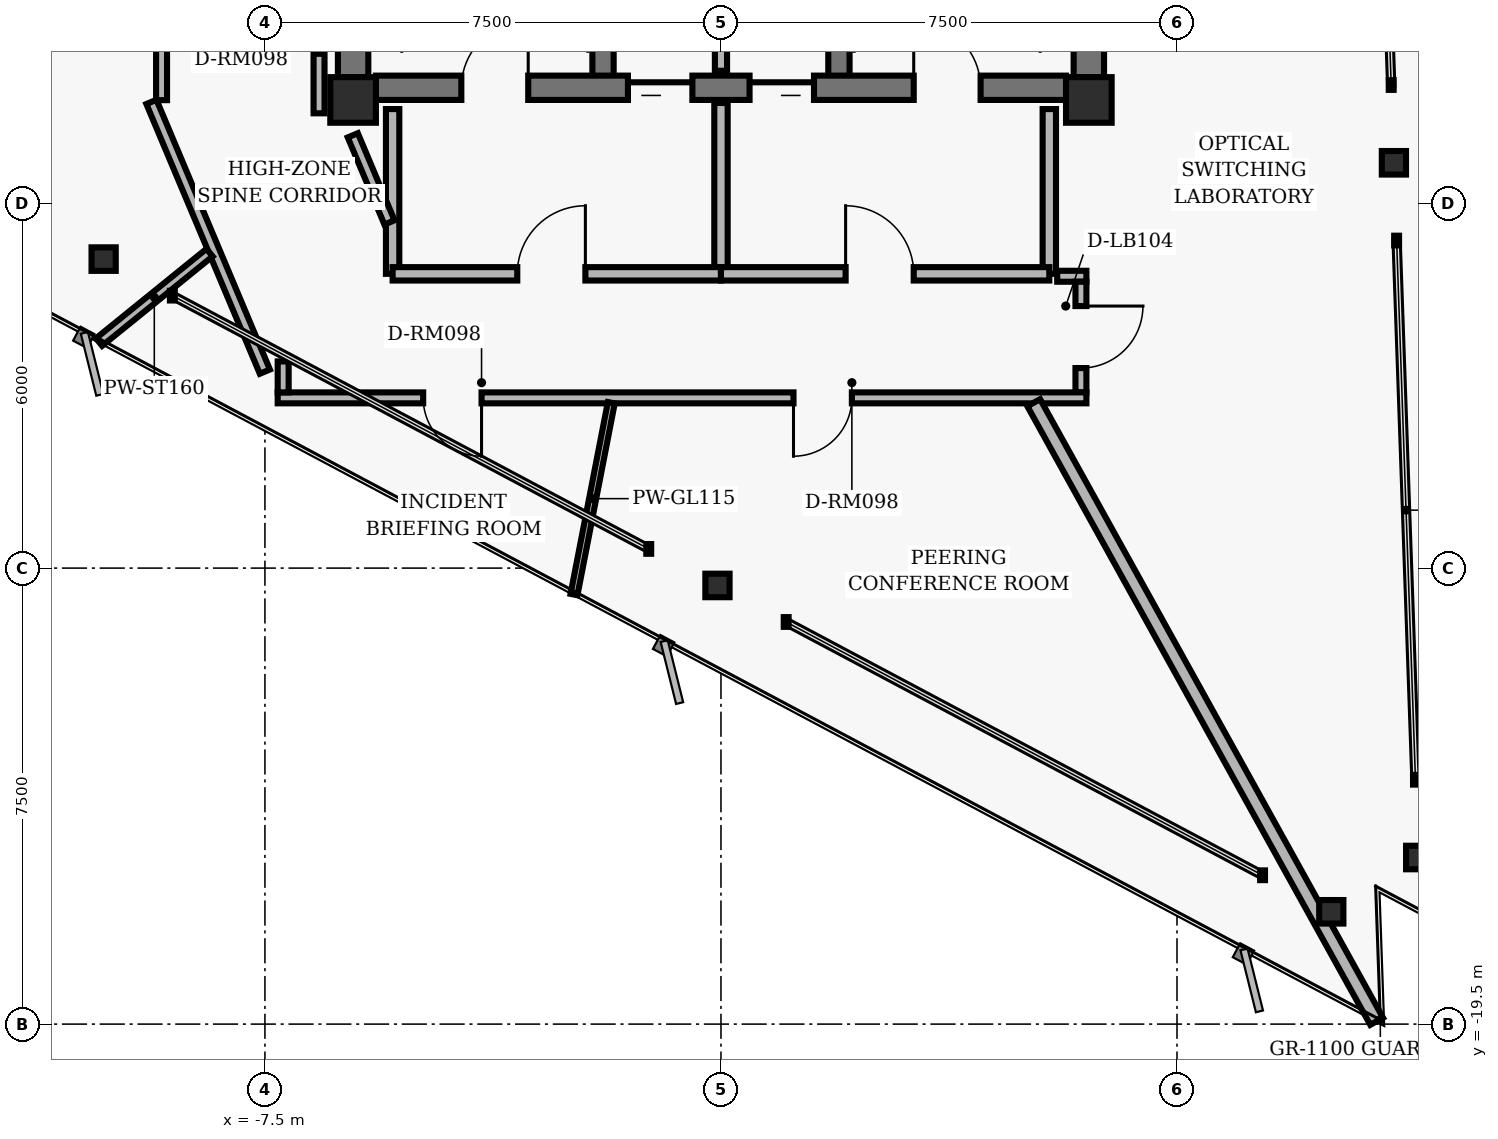
"""IFC4 building model, lengths in metres.
Left out: names, types, materials, properties, quantities, classifications, styles, units other than length and angle.
Written with IfcOpenShell. Run it as: python <this file> out.ifc"""

import sys

from ifc_helpers import new_model, si_unit, direction, frame, frame_2d, origin, origin_2d, place, context, subcontext, project, spatial, rectangle, hollow_rectangle, i_section, extrude, element, fill, save


model = new_model("IFC4")
c1 = context("Model", 3, precision=1e-05, world=origin(), true_north=direction((0.0, 1.0)))
c2 = subcontext(c1, "Body", "Model", "MODEL_VIEW")
j1 = project(units=[si_unit("LENGTHUNIT", "METRE"), si_unit("PLANEANGLEUNIT", "RADIAN")], contexts=[c1])
p1 = place(None, origin())
s1 = spatial("IfcSite", under=j1, at=p1, CompositionType="ELEMENT")
p2 = place(p1, origin())
s2 = spatial("IfcBuilding", under=s1, at=p2, CompositionType="ELEMENT")
p3 = place(p2, frame((0.0, 0.0, 193.6)))
s3 = spatial("IfcBuildingStorey", under=s2, at=p3, CompositionType="ELEMENT", Elevation=193.6)
for number, where, z_axis, x_axis in (
    (1, (-6.05, -4.3, 0.0), (0.0, 0.0, 1.0), (1.0, 0.0, 0.0)),
    (2, (6.05, -4.3, 0.0), (0.0, 0.0, 1.0), (1.0, 0.0, 0.0)),
):
    element("IfcColumn", number, at=place(p3, frame(where, z_axis=z_axis, x_axis=x_axis)), inside=s3, PredefinedType="COLUMN", context=c2, shape_type="SweptSolid", body=[
        extrude(hollow_rectangle(XDim=0.75, YDim=0.75, WallThickness=0.05, InnerFilletRadius=0.02, OuterFilletRadius=0.04, at=origin_2d()), origin(), (0.0, 0.0, 1.0), 3.04),
    ])
for number, where, z_axis, x_axis in (
    (3, (-6.05, -3.925, 0.0), (0.0, 0.0, 1.0), (0.0, 1.0, 0.0)),
    (4, (6.05, -3.925, 0.0), (0.0, 0.0, 1.0), (0.0, 1.0, 0.0)),
):
    element("IfcWall", number, at=place(p3, frame(where, z_axis=z_axis, x_axis=x_axis)), inside=s3, PredefinedType="SHEAR", context=c2, shape_type="SweptSolid", body=[
        extrude(rectangle(XDim=3.55, YDim=0.5, at=frame_2d((1.775, 0.0))), origin(), (0.0, 0.0, 1.0), 2.798),
    ])
for number, where, z_axis, x_axis in (
    (5, (-1.94, -4.1, 0.0), (0.0, 0.0, 1.0), (0.0, 1.0, 0.0)),
    (6, (1.94, -4.1, 0.0), (0.0, 0.0, 1.0), (0.0, 1.0, 0.0)),
):
    element("IfcWall", number, at=place(p3, frame(where, z_axis=z_axis, x_axis=x_axis)), inside=s3, PredefinedType="SHEAR", context=c2, shape_type="SweptSolid", body=[
        extrude(rectangle(XDim=8.2, YDim=0.35, at=frame_2d((4.1, 0.0))), origin(), (0.0, 0.0, 1.0), 2.798),
    ])
p4 = place(p3, frame((-5.675, -4.1, 0.0), z_axis=(0.0, 0.0, 1.0), x_axis=(1.0, 0.0, 0.0)))
e7 = element("IfcWall", 7, at=p4, inside=s3, PredefinedType="SHEAR", context=c2, shape_type="SweptSolid", body=[
    extrude(rectangle(XDim=11.35, YDim=0.4, at=frame_2d((5.675, 0.0))), origin(), (0.0, 0.0, 1.0), 2.798),
])
p5 = place(p4, frame((1.405, 0.0, 0.0)))
e8 = element("IfcOpeningElement", 8, at=p5, cuts=e7, PredefinedType="OPENING", context=c2, shape_type="SweptSolid", body=[
    extrude(rectangle(XDim=1.1, YDim=2.04, at=frame_2d((0.55, 1.02))), frame((0.0, 0.21, 0.0), z_axis=(0.0, -1.0, 0.0), x_axis=(1.0, 0.0, 0.0)), (0.0, 0.0, 1.0), 0.42),
])
p6 = place(p4, frame((8.845, 0.0, 0.0)))
e9 = element("IfcOpeningElement", 9, at=p6, cuts=e7, PredefinedType="OPENING", context=c2, shape_type="SweptSolid", body=[
    extrude(rectangle(XDim=1.1, YDim=2.04, at=frame_2d((0.55, 1.02))), frame((0.0, 0.21, 0.0), z_axis=(0.0, -1.0, 0.0), x_axis=(1.0, 0.0, 0.0)), (0.0, 0.0, 1.0), 0.42),
])
p7 = place(p4, frame((4.145, 0.0, 0.0)))
e10 = element("IfcOpeningElement", 10, at=p7, cuts=e7, PredefinedType="OPENING", context=c2, shape_type="SweptSolid", body=[
    extrude(rectangle(XDim=1.06, YDim=2.04, at=frame_2d((0.53, 1.02))), frame((0.0, 0.21, 0.0), z_axis=(0.0, -1.0, 0.0), x_axis=(1.0, 0.0, 0.0)), (0.0, 0.0, 1.0), 0.42),
])
p8 = place(p4, frame((6.145, 0.0, 0.0)))
e11 = element("IfcOpeningElement", 11, at=p8, cuts=e7, PredefinedType="OPENING", context=c2, shape_type="SweptSolid", body=[
    extrude(rectangle(XDim=1.06, YDim=2.04, at=frame_2d((0.53, 1.02))), frame((0.0, 0.21, 0.0), z_axis=(0.0, -1.0, 0.0), x_axis=(1.0, 0.0, 0.0)), (0.0, 0.0, 1.0), 0.42),
])
for number, where, z_axis, x_axis in (
    (12, (11.466, -16.76, 0.0), (0.0, 0.0, 1.0), (1.0, 0.0, 0.0)),
    (13, (11.067, -5.334, 0.0), (0.0, 0.0, 1.0), (1.0, 0.0, 0.0)),
    (14, (-10.153, -6.918, 0.0), (0.0, 0.0, 1.0), (1.0, 0.0, 0.0)),
    (15, (-0.058, -12.285, 0.0), (0.0, 0.0, 1.0), (1.0, 0.0, 0.0)),
    (16, (10.037, -17.653, 0.0), (0.0, 0.0, 1.0), (1.0, 0.0, 0.0)),
):
    element("IfcColumn", number, at=place(p3, frame(where, z_axis=z_axis, x_axis=x_axis)), inside=s3, PredefinedType="COLUMN", context=c2, shape_type="SweptSolid", body=[
        extrude(i_section(OverallWidth=0.398, OverallDepth=0.387, WebThickness=0.021, FlangeThickness=0.033, FilletRadius=0.018, at=origin_2d()), origin(), (0.0, 0.0, 1.0), 3.04),
    ])
p9 = place(p3, frame((0.0, -3.82, 0.0), z_axis=(0.0, 0.0, 1.0), x_axis=(0.0, 1.0, 0.0)))
e17 = element("IfcWall", 17, at=p9, inside=s3, PredefinedType="PARTITIONING", context=c2, shape_type="SweptSolid", body=[
    extrude(rectangle(XDim=2.67, YDim=0.2, at=frame_2d((1.335, 0.0))), origin(), (0.0, 0.0, 1.0), 2.773),
])
for number, where, z_axis, x_axis in (
    (18, (-5.4, -7.16, 0.0), (0.0, 0.0, 1.0), (0.0, 1.0, 0.0)),
    (19, (5.4, -7.16, 0.0), (0.0, 0.0, 1.0), (0.0, 1.0, 0.0)),
):
    element("IfcWall", number, at=place(p3, frame(where, z_axis=z_axis, x_axis=x_axis)), inside=s3, PredefinedType="PARTITIONING", context=c2, shape_type="SweptSolid", body=[
        extrude(rectangle(XDim=2.71, YDim=0.22, at=frame_2d((1.355, 0.0))), origin(), (0.0, 0.0, 1.0), 2.773),
    ])
p10 = place(p3, frame((0.0, -7.16, 0.0), z_axis=(0.0, 0.0, 1.0), x_axis=(0.0, 1.0, 0.0)))
e20 = element("IfcWall", 20, at=p10, inside=s3, PredefinedType="PARTITIONING", context=c2, shape_type="SweptSolid", body=[
    extrude(rectangle(XDim=2.81, YDim=0.22, at=frame_2d((1.405, 0.0))), origin(), (0.0, 0.0, 1.0), 2.773),
])
p11 = place(p3, frame((-5.4, -7.16, 0.0), z_axis=(0.0, 0.0, 1.0), x_axis=(1.0, 0.0, 0.0)))
e21 = element("IfcWall", 21, at=p11, inside=s3, PredefinedType="PARTITIONING", context=c2, shape_type="SweptSolid", body=[
    extrude(rectangle(XDim=5.4, YDim=0.22, at=frame_2d((2.7, 0.0))), origin(), (0.0, 0.0, 1.0), 2.395),
])
p12 = place(p11, frame((2.05, 0.0, 0.0)))
e22 = element("IfcOpeningElement", 22, at=p12, cuts=e21, PredefinedType="OPENING", context=c2, shape_type="SweptSolid", body=[
    extrude(rectangle(XDim=1.12, YDim=2.02, at=frame_2d((0.56, 1.01))), frame((0.0, 0.12, 0.0), z_axis=(0.0, -1.0, 0.0), x_axis=(1.0, 0.0, 0.0)), (0.0, 0.0, 1.0), 0.24),
])
p13 = place(p3, frame((0.0, -7.16, 0.0), z_axis=(0.0, 0.0, 1.0), x_axis=(1.0, 0.0, 0.0)))
e23 = element("IfcWall", 23, at=p13, inside=s3, PredefinedType="PARTITIONING", context=c2, shape_type="SweptSolid", body=[
    extrude(rectangle(XDim=5.4, YDim=0.22, at=frame_2d((2.7, 0.0))), origin(), (0.0, 0.0, 1.0), 2.773),
])
p14 = place(p13, frame((2.05, 0.0, 0.0)))
e24 = element("IfcOpeningElement", 24, at=p14, cuts=e23, PredefinedType="OPENING", context=c2, shape_type="SweptSolid", body=[
    extrude(rectangle(XDim=1.12, YDim=2.02, at=frame_2d((0.56, 1.01))), frame((0.0, 0.12, 0.0), z_axis=(0.0, -1.0, 0.0), x_axis=(1.0, 0.0, 0.0)), (0.0, 0.0, 1.0), 0.24),
])
p15 = place(p3, frame((-7.501, -8.769, 0.0), z_axis=(0.0, 0.0, 1.0), x_axis=(-0.387573945081, 0.921838617706, 0.0)))
e25 = element("IfcWall", 25, at=p15, inside=s3, PredefinedType="PARTITIONING", context=c2, shape_type="SweptSolid", body=[
    extrude(rectangle(XDim=4.813, YDim=0.18, at=frame_2d((2.407, 0.0))), origin(), (0.0, 0.0, 1.0), 2.773),
])
p16 = place(p3, frame((-9.2, -4.303, 0.0), z_axis=(0.0, 0.0, 1.0), x_axis=(0.0, 1.0, 0.0)))
e26 = element("IfcWall", 26, at=p16, inside=s3, PredefinedType="PARTITIONING", context=c2, shape_type="SweptSolid", body=[
    extrude(rectangle(XDim=8.607, YDim=0.18, at=frame_2d((4.303, 0.0))), origin(), (0.0, 0.0, 1.0), 2.773),
])
p17 = place(p16, frame((1.721, 0.0, 0.0)))
e27 = element("IfcOpeningElement", 27, at=p17, cuts=e26, PredefinedType="OPENING", context=c2, shape_type="SweptSolid", body=[
    extrude(rectangle(XDim=0.96, YDim=2.02, at=frame_2d((0.48, 1.01))), frame((0.0, 0.1, 0.0), z_axis=(0.0, -1.0, 0.0), x_axis=(1.0, 0.0, 0.0)), (0.0, 0.0, 1.0), 0.2),
])
p18 = place(p16, frame((6.58, 0.0, 0.0)))
e28 = element("IfcOpeningElement", 28, at=p18, cuts=e26, PredefinedType="OPENING", context=c2, shape_type="SweptSolid", body=[
    extrude(rectangle(XDim=0.96, YDim=2.02, at=frame_2d((0.48, 1.01))), frame((0.0, 0.1, 0.0), z_axis=(0.0, -1.0, 0.0), x_axis=(1.0, 0.0, 0.0)), (0.0, 0.0, 1.0), 0.2),
])
p19 = place(p16, frame((4.367, 0.0, 0.0)))
e29 = element("IfcOpeningElement", 29, at=p19, cuts=e26, PredefinedType="OPENING", context=c2, shape_type="SweptSolid", body=[
    extrude(rectangle(XDim=1.18, YDim=2.02, at=frame_2d((0.59, 1.01))), frame((0.0, 0.1, 0.0), z_axis=(0.0, -1.0, 0.0), x_axis=(1.0, 0.0, 0.0)), (0.0, 0.0, 1.0), 0.2),
])
p20 = place(p3, frame((-6.61, -3.541, 0.0), z_axis=(0.0, 0.0, 1.0), x_axis=(0.0, -1.0, 0.0)))
e30 = element("IfcWall", 30, at=p20, inside=s3, PredefinedType="PARTITIONING", context=c2, shape_type="SweptSolid", body=[
    extrude(rectangle(XDim=0.979, YDim=0.18, at=frame_2d((0.489, 0.0))), origin(), (0.0, 0.0, 1.0), 2.773),
])
p21 = place(p3, frame((-6.055, -4.882, 0.0), z_axis=(0.0, 0.0, 1.0), x_axis=(0.387579540458, -0.921836265189, 0.0)))
e31 = element("IfcWall", 31, at=p21, inside=s3, PredefinedType="PARTITIONING", context=c2, shape_type="SweptSolid", body=[
    extrude(rectangle(XDim=1.555, YDim=0.18, at=frame_2d((0.777, 0.0))), origin(), (0.0, 0.0, 1.0), 2.253),
])
p22 = place(p3, frame((5.53, -7.2, 0.0), z_axis=(0.0, 0.0, 1.0), x_axis=(1.0, 0.0, 0.0)))
e32 = element("IfcWall", 32, at=p22, inside=s3, PredefinedType="PARTITIONING", context=c2, shape_type="SweptSolid", body=[
    extrude(rectangle(XDim=0.48, YDim=0.18, at=frame_2d((0.24, 0.0))), origin(), (0.0, 0.0, 1.0), 2.773),
])
p23 = place(p3, frame((5.92, -7.29, 0.0), z_axis=(0.0, 0.0, 1.0), x_axis=(0.0, -1.0, 0.0)))
e33 = element("IfcWall", 33, at=p23, inside=s3, PredefinedType="PARTITIONING", context=c2, shape_type="SweptSolid", body=[
    extrude(rectangle(XDim=1.82, YDim=0.18, at=frame_2d((0.91, 0.0))), origin(), (0.0, 0.0, 1.0), 2.773),
])
p24 = place(p23, frame((0.4, 0.0, 0.0)))
e34 = element("IfcOpeningElement", 34, at=p24, cuts=e33, PredefinedType="OPENING", context=c2, shape_type="SweptSolid", body=[
    extrude(rectangle(XDim=1.02, YDim=2.02, at=frame_2d((0.51, 1.01))), frame((0.0, 0.1, 0.0), z_axis=(0.0, -1.0, 0.0), x_axis=(1.0, 0.0, 0.0)), (0.0, 0.0, 1.0), 0.2),
])
p25 = place(p3, frame((6.01, -9.2, 0.0), z_axis=(0.0, 0.0, 1.0), x_axis=(-1.0, 0.0, 0.0)))
e35 = element("IfcWall", 35, at=p25, inside=s3, PredefinedType="PARTITIONING", context=c2, shape_type="SweptSolid", body=[
    extrude(rectangle(XDim=13.3, YDim=0.18, at=frame_2d((6.65, 0.0))), origin(), (0.0, 0.0, 1.0), 2.395),
])
p26 = place(p25, frame((9.948, 0.0, 0.0)))
e36 = element("IfcOpeningElement", 36, at=p26, cuts=e35, PredefinedType="OPENING", context=c2, shape_type="SweptSolid", body=[
    extrude(rectangle(XDim=0.96, YDim=2.02, at=frame_2d((0.48, 1.01))), frame((0.0, 0.1, 0.0), z_axis=(0.0, -1.0, 0.0), x_axis=(1.0, 0.0, 0.0)), (0.0, 0.0, 1.0), 0.2),
])
p27 = place(p25, frame((3.857, 0.0, 0.0)))
e37 = element("IfcOpeningElement", 37, at=p27, cuts=e35, PredefinedType="OPENING", context=c2, shape_type="SweptSolid", body=[
    extrude(rectangle(XDim=0.96, YDim=2.02, at=frame_2d((0.48, 1.01))), frame((0.0, 0.1, 0.0), z_axis=(0.0, -1.0, 0.0), x_axis=(1.0, 0.0, 0.0)), (0.0, 0.0, 1.0), 0.2),
])
p28 = place(p3, frame((-7.2, -9.11, 0.0), z_axis=(0.0, 0.0, 1.0), x_axis=(0.0, 1.0, 0.0)))
e38 = element("IfcWall", 38, at=p28, inside=s3, PredefinedType="PARTITIONING", context=c2, shape_type="SweptSolid", body=[
    extrude(rectangle(XDim=0.51, YDim=0.18, at=frame_2d((0.255, 0.0))), origin(), (0.0, 0.0, 1.0), 2.773),
])
p29 = place(p3, frame((-8.411, -6.811, 0.0), z_axis=(0.0, 0.0, 1.0), x_axis=(-0.777176762159, -0.629282353448, 0.0)))
e39 = element("IfcWall", 39, at=p29, inside=s3, PredefinedType="PARTITIONING", context=c2, shape_type="SweptSolid", body=[
    extrude(rectangle(XDim=2.337, YDim=0.16, at=frame_2d((1.169, 0.0))), origin(), (0.0, 0.0, 1.0), 2.773),
])
p30 = place(p3, frame((-1.804, -9.28, 0.0), z_axis=(0.0, 0.0, 1.0), x_axis=(-0.190810698239, -0.981626852443, 0.0)))
e40 = element("IfcWall", 40, at=p30, inside=s3, PredefinedType="MOVABLE", context=c2, shape_type="SweptSolid", body=[
    extrude(rectangle(XDim=3.214, YDim=0.115, at=frame_2d((1.607, 0.0))), origin(), (0.0, 0.0, 1.0), 2.773),
])
p31 = place(p3, frame((5.144, -9.28, 0.0), z_axis=(0.0, 0.0, 1.0), x_axis=(0.484798043034, -0.874626124393, 0.0)))
e41 = element("IfcWall", 41, at=p31, inside=s3, PredefinedType="PARTITIONING", context=c2, shape_type="SweptSolid", body=[
    extrude(rectangle(XDim=11.633, YDim=0.24, at=frame_2d((5.816, 0.0))), origin(), (0.0, 0.0, 1.0), 2.253),
])
p32 = place(p5, origin())
e42 = element("IfcDoor", 42, at=p32, inside=s3, OperationType="SINGLE_SWING_RIGHT", PredefinedType="DOOR", context=c2, shape_type="SweptSolid", body=[
    extrude(rectangle(XDim=1.1, YDim=2.04, at=frame_2d((0.55, 1.02))), frame((0.0, 0.025, 0.0), z_axis=(0.0, -1.0, 0.0), x_axis=(1.0, 0.0, 0.0)), (0.0, 0.0, 1.0), 0.05),
])
fill(e8, e42)
p33 = place(p6, origin())
e43 = element("IfcDoor", 43, at=p33, inside=s3, OperationType="SINGLE_SWING_LEFT", PredefinedType="DOOR", context=c2, shape_type="SweptSolid", body=[
    extrude(rectangle(XDim=1.1, YDim=2.04, at=frame_2d((0.55, 1.02))), frame((0.0, 0.025, 0.0), z_axis=(0.0, -1.0, 0.0), x_axis=(1.0, 0.0, 0.0)), (0.0, 0.0, 1.0), 0.05),
])
fill(e9, e43)
p34 = place(p7, origin())
e44 = element("IfcDoor", 44, at=p34, inside=s3, OperationType="SLIDING_TO_LEFT", PredefinedType="DOOR", context=c2, shape_type="SweptSolid", body=[
    extrude(rectangle(XDim=1.06, YDim=2.04, at=frame_2d((0.53, 1.02))), frame((0.0, 0.025, 0.0), z_axis=(0.0, -1.0, 0.0), x_axis=(1.0, 0.0, 0.0)), (0.0, 0.0, 1.0), 0.05),
])
fill(e10, e44)
p35 = place(p8, origin())
e45 = element("IfcDoor", 45, at=p35, inside=s3, OperationType="SLIDING_TO_RIGHT", PredefinedType="DOOR", context=c2, shape_type="SweptSolid", body=[
    extrude(rectangle(XDim=1.06, YDim=2.04, at=frame_2d((0.53, 1.02))), frame((0.0, 0.025, 0.0), z_axis=(0.0, -1.0, 0.0), x_axis=(1.0, 0.0, 0.0)), (0.0, 0.0, 1.0), 0.05),
])
fill(e11, e45)
p36 = place(p12, origin())
e46 = element("IfcDoor", 46, at=p36, inside=s3, OperationType="SINGLE_SWING_RIGHT", PredefinedType="DOOR", context=c2, shape_type="SweptSolid", body=[
    extrude(rectangle(XDim=1.12, YDim=2.02, at=frame_2d((0.56, 1.01))), frame((0.0, 0.025, 0.0), z_axis=(0.0, -1.0, 0.0), x_axis=(1.0, 0.0, 0.0)), (0.0, 0.0, 1.0), 0.05),
])
fill(e22, e46)
p37 = place(p14, origin())
e47 = element("IfcDoor", 47, at=p37, inside=s3, OperationType="SINGLE_SWING_LEFT", PredefinedType="DOOR", context=c2, shape_type="SweptSolid", body=[
    extrude(rectangle(XDim=1.12, YDim=2.02, at=frame_2d((0.56, 1.01))), frame((0.0, 0.025, 0.0), z_axis=(0.0, -1.0, 0.0), x_axis=(1.0, 0.0, 0.0)), (0.0, 0.0, 1.0), 0.05),
])
fill(e24, e47)
p38 = place(p26, origin())
e48 = element("IfcDoor", 48, at=p38, inside=s3, OperationType="SINGLE_SWING_LEFT", PredefinedType="DOOR", context=c2, shape_type="SweptSolid", body=[
    extrude(rectangle(XDim=0.96, YDim=2.02, at=frame_2d((0.48, 1.01))), frame((0.0, 0.025, 0.0), z_axis=(0.0, -1.0, 0.0), x_axis=(1.0, 0.0, 0.0)), (0.0, 0.0, 1.0), 0.05),
])
fill(e36, e48)
p39 = place(p27, origin())
e49 = element("IfcDoor", 49, at=p39, inside=s3, OperationType="SINGLE_SWING_RIGHT", PredefinedType="DOOR", context=c2, shape_type="SweptSolid", body=[
    extrude(rectangle(XDim=0.96, YDim=2.02, at=frame_2d((0.48, 1.01))), frame((0.0, 0.025, 0.0), z_axis=(0.0, -1.0, 0.0), x_axis=(1.0, 0.0, 0.0)), (0.0, 0.0, 1.0), 0.05),
])
fill(e37, e49)
p40 = place(p24, origin())
e50 = element("IfcDoor", 50, at=p40, inside=s3, OperationType="SINGLE_SWING_LEFT", PredefinedType="DOOR", context=c2, shape_type="SweptSolid", body=[
    extrude(rectangle(XDim=1.02, YDim=2.02, at=frame_2d((0.51, 1.01))), frame((0.0, 0.025, 0.0), z_axis=(0.0, -1.0, 0.0), x_axis=(1.0, 0.0, 0.0)), (0.0, 0.0, 1.0), 0.05),
])
fill(e34, e50)
save(model, sys.argv[1])
